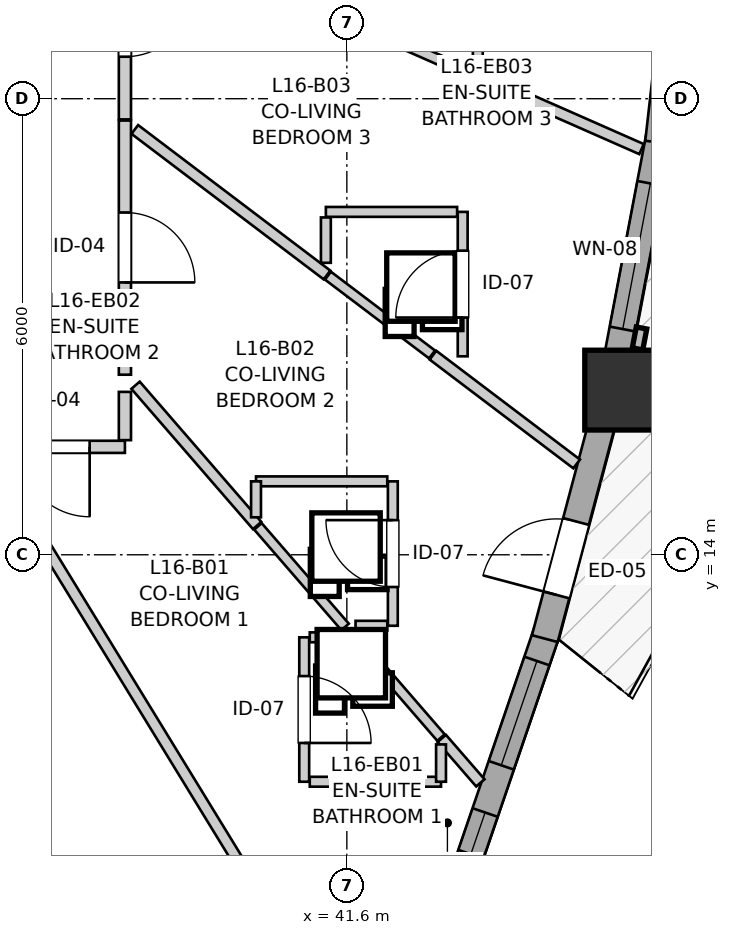
"""IFC4 building model, lengths in metres.
Left out: names, types, materials, properties, quantities, classifications, styles, units other than length and angle.
Written with IfcOpenShell. Run it as: python <this file> out.ifc"""

import sys

from ifc_helpers import new_model, si_unit, direction, frame, frame_2d, origin, origin_2d, place, context, subcontext, project, spatial, rectangle, extrude, source, transform, mapped, element, fill, save


model = new_model("IFC4")
c1 = context("Model", 3, precision=1e-05, world=origin(), true_north=direction((0.0, 1.0)))
c2 = subcontext(c1, "Body", "Model", "MODEL_VIEW")
j1 = project(units=[si_unit("LENGTHUNIT", "METRE"), si_unit("PLANEANGLEUNIT", "RADIAN")], contexts=[c1])
p1 = place(None, origin())
s1 = spatial("IfcSite", under=j1, at=p1, CompositionType="ELEMENT")
p2 = place(p1, origin())
s2 = spatial("IfcBuilding", under=s1, at=p2, CompositionType="ELEMENT")
p3 = place(p2, frame((0.0, 0.0, 55.8)))
s3 = spatial("IfcBuildingStorey", under=s2, at=p3, CompositionType="ELEMENT", Elevation=55.8)
m1 = source(origin(), c2, "Body", "SweptSolid", [
    extrude(rectangle(XDim=1.05, YDim=1.05, at=origin_2d()), origin(), (0.0, 0.0, 1.0), 2.94),
])
p4 = place(p3, frame((45.256, 16.166, 0.0), z_axis=(0.0, 0.0, 1.0), x_axis=(1.0, 0.0, 0.0)))
e1 = element("IfcColumn", 1, at=p4, inside=s3, PredefinedType="COLUMN", context=c2, shape_type="MappedRepresentation", body=[
    mapped(m1, transform((0.0, 0.0, 0.0), x_axis=(1.0, 0.0, 0.0), y_axis=(0.0, 1.0, 0.0), z_axis=(0.0, 0.0, 1.0), scale=1.0)),
])
p5 = place(p3, frame((43.104, 9.686, 0.0), z_axis=(0.0, 0.0, 1.0), x_axis=(0.323558843572, 0.946208050455, 0.0)))
e2 = element("IfcWall", 2, at=p5, inside=s3, PredefinedType="SOLIDWALL", context=c2, shape_type="SweptSolid", body=[
    extrude(rectangle(XDim=3.482, YDim=0.35, at=frame_2d((1.741, 0.0))), origin(), (0.0, 0.0, 1.0), 2.42),
])
p6 = place(p5, frame((0.396, 0.0, 0.82)))
e3 = element("IfcOpeningElement", 3, at=p6, cuts=e2, PredefinedType="OPENING", context=c2, shape_type="SweptSolid", body=[
    extrude(rectangle(XDim=0.58, YDim=1.35, at=frame_2d((0.29, 0.675))), frame((0.0, 0.185, 0.0), z_axis=(0.0, -1.0, 0.0), x_axis=(1.0, 0.0, 0.0)), (0.0, 0.0, 1.0), 0.37),
])
p7 = place(p5, frame((1.632, 0.0, 0.82)))
e4 = element("IfcOpeningElement", 4, at=p7, cuts=e2, PredefinedType="OPENING", context=c2, shape_type="SweptSolid", body=[
    extrude(rectangle(XDim=1.45, YDim=1.25, at=frame_2d((0.725, 0.625))), frame((0.0, 0.185, 0.0), z_axis=(0.0, -1.0, 0.0), x_axis=(1.0, 0.0, 0.0)), (0.0, 0.0, 1.0), 0.37),
])
p8 = place(p3, frame((44.205, 12.897, 0.0), z_axis=(0.0, 0.0, 1.0), x_axis=(0.257099428233, 0.966384956424, 0.0)))
e5 = element("IfcWall", 5, at=p8, inside=s3, PredefinedType="SOLIDWALL", context=c2, shape_type="SweptSolid", body=[
    extrude(rectangle(XDim=3.13, YDim=0.35, at=frame_2d((1.565, 0.0))), origin(), (0.0, 0.0, 1.0), 2.42),
])
p9 = place(p8, frame((0.595, 0.0, 0.0)))
e6 = element("IfcOpeningElement", 6, at=p9, cuts=e5, PredefinedType="OPENING", context=c2, shape_type="SweptSolid", body=[
    extrude(rectangle(XDim=1.0, YDim=2.1, at=frame_2d((0.5, 1.05))), frame((0.0, 0.185, 0.0), z_axis=(0.0, -1.0, 0.0), x_axis=(1.0, 0.0, 0.0)), (0.0, 0.0, 1.0), 0.37),
])
p10 = place(p3, frame((45.14, 16.494, 0.0), z_axis=(0.0, 0.0, 1.0), x_axis=(0.186608529586, 0.982434352354, 0.0)))
e7 = element("IfcWall", 7, at=p10, inside=s3, PredefinedType="SOLIDWALL", context=c2, shape_type="SweptSolid", body=[
    extrude(rectangle(XDim=3.074, YDim=0.35, at=frame_2d((1.537, 0.0))), origin(), (0.0, 0.0, 1.0), 2.42),
])
p11 = place(p10, frame((0.484, 0.0, 0.82)))
e8 = element("IfcOpeningElement", 8, at=p11, cuts=e7, PredefinedType="OPENING", context=c2, shape_type="SweptSolid", body=[
    extrude(rectangle(XDim=1.95, YDim=1.4, at=frame_2d((0.975, 0.7))), frame((0.0, 0.185, 0.0), z_axis=(0.0, -1.0, 0.0), x_axis=(1.0, 0.0, 0.0)), (0.0, 0.0, 1.0), 0.37),
])
p12 = place(p3, frame((45.7, 19.426, 0.0), z_axis=(0.0, 0.0, 1.0), x_axis=(0.113266370988, 0.993564657787, 0.0)))
e9 = element("IfcWall", 9, at=p12, inside=s3, PredefinedType="SOLIDWALL", context=c2, shape_type="SweptSolid", body=[
    extrude(rectangle(XDim=3.317, YDim=0.35, at=frame_2d((1.659, 0.0))), origin(), (0.0, 0.0, 1.0), 2.42),
])
p13 = place(p12, frame((0.869, 0.0, 0.82)))
e10 = element("IfcOpeningElement", 10, at=p13, cuts=e9, PredefinedType="OPENING", context=c2, shape_type="SweptSolid", body=[
    extrude(rectangle(XDim=1.6, YDim=1.35, at=frame_2d((0.8, 0.675))), frame((0.0, 0.185, 0.0), z_axis=(0.0, -1.0, 0.0), x_axis=(1.0, 0.0, 0.0)), (0.0, 0.0, 1.0), 0.37),
])
p14 = place(p3, frame((38.68, 19.713, 0.0), z_axis=(0.0, 0.0, 1.0), x_axis=(0.0, -1.0, 0.0)))
e11 = element("IfcWall", 11, at=p14, inside=s3, PredefinedType="PARTITIONING", context=c2, shape_type="SweptSolid", body=[
    extrude(rectangle(XDim=3.344, YDim=0.16, at=frame_2d((1.672, 0.0))), origin(), (0.0, 0.0, 1.0), 2.94),
])
p15 = place(p14, frame((1.21, 0.0, 0.0)))
e12 = element("IfcOpeningElement", 12, at=p15, cuts=e11, PredefinedType="OPENING", context=c2, shape_type="SweptSolid", body=[
    extrude(rectangle(XDim=0.92, YDim=2.1, at=frame_2d((0.46, 1.05))), frame((0.0, 0.09, 0.0), z_axis=(0.0, -1.0, 0.0), x_axis=(1.0, 0.0, 0.0)), (0.0, 0.0, 1.0), 0.18),
])
p16 = place(p3, frame((38.68, 22.348, 0.0), z_axis=(0.0, 0.0, 1.0), x_axis=(0.0, -1.0, 0.0)))
e13 = element("IfcWall", 13, at=p16, inside=s3, PredefinedType="PARTITIONING", context=c2, shape_type="SweptSolid", body=[
    extrude(rectangle(XDim=2.62, YDim=0.16, at=frame_2d((1.31, 0.0))), origin(), (0.0, 0.0, 1.0), 2.94),
])
p17 = place(p16, frame((0.875, 0.0, 0.0)))
e14 = element("IfcOpeningElement", 14, at=p17, cuts=e13, PredefinedType="OPENING", context=c2, shape_type="SweptSolid", body=[
    extrude(rectangle(XDim=0.92, YDim=2.1, at=frame_2d((0.46, 1.05))), frame((0.0, 0.09, 0.0), z_axis=(0.0, -1.0, 0.0), x_axis=(1.0, 0.0, 0.0)), (0.0, 0.0, 1.0), 0.18),
])
p18 = place(p3, frame((41.039, 12.914, 0.0), z_axis=(0.0, 0.0, 1.0), x_axis=(0.0, -1.0, 0.0)))
e15 = element("IfcWall", 15, at=p18, inside=s3, PredefinedType="PARTITIONING", context=c2, shape_type="SweptSolid", body=[
    extrude(rectangle(XDim=1.9, YDim=0.13, at=frame_2d((0.95, 0.0))), origin(), (0.0, 0.0, 1.0), 2.94),
])
p19 = place(p18, frame((0.51, 0.0, 0.0)))
e16 = element("IfcOpeningElement", 16, at=p19, cuts=e15, PredefinedType="OPENING", context=c2, shape_type="SweptSolid", body=[
    extrude(rectangle(XDim=0.88, YDim=2.05, at=frame_2d((0.44, 1.025))), frame((0.0, 0.075, 0.0), z_axis=(0.0, -1.0, 0.0), x_axis=(1.0, 0.0, 0.0)), (0.0, 0.0, 1.0), 0.15),
])
p20 = place(p3, frame((42.205, 13.066, 0.0), z_axis=(0.0, 0.0, 1.0), x_axis=(0.0, 1.0, 0.0)))
e17 = element("IfcWall", 17, at=p20, inside=s3, PredefinedType="PARTITIONING", context=c2, shape_type="SweptSolid", body=[
    extrude(rectangle(XDim=1.9, YDim=0.13, at=frame_2d((0.95, 0.0))), origin(), (0.0, 0.0, 1.0), 2.94),
])
p21 = place(p20, frame((0.51, 0.0, 0.0)))
e18 = element("IfcOpeningElement", 18, at=p21, cuts=e17, PredefinedType="OPENING", context=c2, shape_type="SweptSolid", body=[
    extrude(rectangle(XDim=0.88, YDim=2.05, at=frame_2d((0.44, 1.025))), frame((0.0, 0.075, 0.0), z_axis=(0.0, -1.0, 0.0), x_axis=(1.0, 0.0, 0.0)), (0.0, 0.0, 1.0), 0.15),
])
p22 = place(p3, frame((43.124, 16.611, 0.0), z_axis=(0.0, 0.0, 1.0), x_axis=(0.0, 1.0, 0.0)))
e19 = element("IfcWall", 19, at=p22, inside=s3, PredefinedType="PARTITIONING", context=c2, shape_type="SweptSolid", body=[
    extrude(rectangle(XDim=1.9, YDim=0.13, at=frame_2d((0.95, 0.0))), origin(), (0.0, 0.0, 1.0), 2.94),
])
p23 = place(p22, frame((0.51, 0.0, 0.0)))
e20 = element("IfcOpeningElement", 20, at=p23, cuts=e19, PredefinedType="OPENING", context=c2, shape_type="SweptSolid", body=[
    extrude(rectangle(XDim=0.88, YDim=2.05, at=frame_2d((0.44, 1.025))), frame((0.0, 0.075, 0.0), z_axis=(0.0, -1.0, 0.0), x_axis=(1.0, 0.0, 0.0)), (0.0, 0.0, 1.0), 0.15),
])
p24 = place(p3, frame((43.323, 20.286, 0.0), z_axis=(0.0, 0.0, 1.0), x_axis=(0.0, 1.0, 0.0)))
e21 = element("IfcWall", 21, at=p24, inside=s3, PredefinedType="PARTITIONING", context=c2, shape_type="SweptSolid", body=[
    extrude(rectangle(XDim=1.845, YDim=0.13, at=frame_2d((0.923, 0.0))), origin(), (0.0, 0.0, 1.0), 2.94),
])
p25 = place(p24, frame((0.482, 0.0, 0.0)))
e22 = element("IfcOpeningElement", 22, at=p25, cuts=e21, PredefinedType="OPENING", context=c2, shape_type="SweptSolid", body=[
    extrude(rectangle(XDim=0.88, YDim=2.05, at=frame_2d((0.44, 1.025))), frame((0.0, 0.075, 0.0), z_axis=(0.0, -1.0, 0.0), x_axis=(1.0, 0.0, 0.0)), (0.0, 0.0, 1.0), 0.15),
])
p26 = place(p3, frame((38.68, 15.42, 0.0), z_axis=(0.0, 0.0, 1.0), x_axis=(-1.0, 0.0, 0.0)))
e23 = element("IfcWall", 23, at=p26, inside=s3, PredefinedType="PARTITIONING", context=c2, shape_type="SweptSolid", body=[
    extrude(rectangle(XDim=1.816, YDim=0.16, at=frame_2d((0.908, 0.0))), origin(), (0.0, 0.0, 1.0), 2.94),
])
p27 = place(p26, frame((0.464, 0.0, 0.0)))
e24 = element("IfcOpeningElement", 24, at=p27, cuts=e23, PredefinedType="OPENING", context=c2, shape_type="SweptSolid", body=[
    extrude(rectangle(XDim=0.92, YDim=2.1, at=frame_2d((0.46, 1.05))), frame((0.0, 0.09, 0.0), z_axis=(0.0, -1.0, 0.0), x_axis=(1.0, 0.0, 0.0)), (0.0, 0.0, 1.0), 0.18),
])
p28 = place(p3, frame((36.908, 15.295, 0.0), z_axis=(0.0, 0.0, 1.0), x_axis=(0.522407183079, -0.852696156358, 0.0)))
e25 = element("IfcWall", 25, at=p28, inside=s3, PredefinedType="PARTITIONING", context=c2, shape_type="SweptSolid", body=[
    extrude(rectangle(XDim=9.87, YDim=0.145, at=frame_2d((4.935, 0.0))), origin(), (0.0, 0.0, 1.0), 2.94),
])
p29 = place(p3, frame((38.81, 19.595, 0.0), z_axis=(0.0, 0.0, 1.0), x_axis=(0.797304275437, -0.603577577756, 0.0)))
e26 = element("IfcWall", 26, at=p29, inside=s3, PredefinedType="PARTITIONING", context=c2, shape_type="SweptSolid", body=[
    extrude(rectangle(XDim=3.172, YDim=0.145, at=frame_2d((1.586, 0.0))), origin(), (0.0, 0.0, 1.0), 2.94),
])
p30 = place(p3, frame((38.82, 16.23, 0.0), z_axis=(0.0, 0.0, 1.0), x_axis=(0.655037088123, -0.755596726556, 0.0)))
e27 = element("IfcWall", 27, at=p30, inside=s3, PredefinedType="PARTITIONING", context=c2, shape_type="SweptSolid", body=[
    extrude(rectangle(XDim=2.442, YDim=0.145, at=frame_2d((1.221, 0.0))), origin(), (0.0, 0.0, 1.0), 2.94),
])
p31 = place(p3, frame((43.41, 20.248, 0.0), z_axis=(0.0, 0.0, 1.0), x_axis=(0.915032786041, -0.403379474527, 0.0)))
e28 = element("IfcWall", 28, at=p31, inside=s3, PredefinedType="PARTITIONING", context=c2, shape_type="SweptSolid", body=[
    extrude(rectangle(XDim=2.259, YDim=0.145, at=frame_2d((1.13, 0.0))), origin(), (0.0, 0.0, 1.0), 2.94),
])
p32 = place(p3, frame((42.733, 16.626, 0.0), z_axis=(0.0, 0.0, 1.0), x_axis=(0.797372907097, -0.603486907089, 0.0)))
e29 = element("IfcWall", 29, at=p32, inside=s3, PredefinedType="PARTITIONING", context=c2, shape_type="SweptSolid", body=[
    extrude(rectangle(XDim=2.371, YDim=0.145, at=frame_2d((1.186, 0.0))), origin(), (0.0, 0.0, 1.0), 2.94),
])
p33 = place(p3, frame((41.65, 21.023, 0.0), z_axis=(0.0, 0.0, 1.0), x_axis=(0.915165742406, -0.403077739309, 0.0)))
e30 = element("IfcWall", 30, at=p33, inside=s3, PredefinedType="PARTITIONING", context=c2, shape_type="SweptSolid", body=[
    extrude(rectangle(XDim=1.689, YDim=0.13, at=frame_2d((0.844, 0.0))), origin(), (0.0, 0.0, 1.0), 2.94),
])
for number, where, z_axis, x_axis in (
    (31, (41.324, 18.511, 0.0), (0.0, 0.0, 1.0), (1.0, 0.0, 0.0)),
    (32, (41.112, 11.014, 0.0), (0.0, 0.0, 1.0), (1.0, 0.0, 0.0)),
    (33, (40.405, 14.966, 0.0), (0.0, 0.0, 1.0), (1.0, 0.0, 0.0)),
):
    element("IfcWall", number, at=place(p3, frame(where, z_axis=z_axis, x_axis=x_axis)), inside=s3, PredefinedType="PARTITIONING", context=c2, shape_type="SweptSolid", body=[
        extrude(rectangle(XDim=1.727, YDim=0.13, at=frame_2d((0.864, 0.0))), origin(), (0.0, 0.0, 1.0), 2.94),
    ])
p34 = place(p3, frame((40.43, 14.374, 0.0), z_axis=(0.0, 0.0, 1.0), x_axis=(0.655121637619, -0.755523421162, 0.0)))
e34 = element("IfcWall", 34, at=p34, inside=s3, PredefinedType="PARTITIONING", context=c2, shape_type="SweptSolid", body=[
    extrude(rectangle(XDim=1.751, YDim=0.13, at=frame_2d((0.875, 0.0))), origin(), (0.0, 0.0, 1.0), 2.94),
])
p35 = place(p3, frame((41.696, 12.914, 0.0), z_axis=(0.0, 0.0, 1.0), x_axis=(0.654882611276, -0.755730616985, 0.0)))
e35 = element("IfcWall", 35, at=p35, inside=s3, PredefinedType="PARTITIONING", context=c2, shape_type="SweptSolid", body=[
    extrude(rectangle(XDim=1.745, YDim=0.13, at=frame_2d((0.873, 0.0))), origin(), (0.0, 0.0, 1.0), 2.94),
])
p36 = place(p3, frame((41.351, 17.672, 0.0), z_axis=(0.0, 0.0, 1.0), x_axis=(0.797400841938, -0.603449995672, 0.0)))
e36 = element("IfcWall", 36, at=p36, inside=s3, PredefinedType="PARTITIONING", context=c2, shape_type="SweptSolid", body=[
    extrude(rectangle(XDim=1.718, YDim=0.13, at=frame_2d((0.859, 0.0))), origin(), (0.0, 0.0, 1.0), 2.94),
])
p37 = place(p3, frame((38.68, 15.508, 0.0), z_axis=(0.0, 0.0, 1.0), x_axis=(0.0, 1.0, 0.0)))
e37 = element("IfcWall", 37, at=p37, inside=s3, PredefinedType="PARTITIONING", context=c2, shape_type="SweptSolid", body=[
    extrude(rectangle(XDim=0.635, YDim=0.16, at=frame_2d((0.317, 0.0))), origin(), (0.0, 0.0, 1.0), 2.94),
])
p38 = place(p3, frame((41.324, 17.841, 0.0), z_axis=(0.0, 0.0, 1.0), x_axis=(0.0, 1.0, 0.0)))
e38 = element("IfcWall", 38, at=p38, inside=s3, PredefinedType="PARTITIONING", context=c2, shape_type="SweptSolid", body=[
    extrude(rectangle(XDim=0.597, YDim=0.13, at=frame_2d((0.298, 0.0))), origin(), (0.0, 0.0, 1.0), 2.94),
])
p39 = place(p3, frame((42.849, 11.584, 0.0), z_axis=(0.0, 0.0, 1.0), x_axis=(0.655530542193, -0.755168662123, 0.0)))
e39 = element("IfcWall", 39, at=p39, inside=s3, PredefinedType="PARTITIONING", context=c2, shape_type="SweptSolid", body=[
    extrude(rectangle(XDim=0.774, YDim=0.145, at=frame_2d((0.387, 0.0))), origin(), (0.0, 0.0, 1.0), 2.94),
])
p40 = place(p3, frame((41.112, 12.914, 0.0), z_axis=(0.0, 0.0, 1.0), x_axis=(1.0, 0.0, 0.0)))
e40 = element("IfcWall", 40, at=p40, inside=s3, PredefinedType="PARTITIONING", context=c2, shape_type="SweptSolid", body=[
    extrude(rectangle(XDim=0.434, YDim=0.13, at=frame_2d((0.217, 0.0))), origin(), (0.0, 0.0, 1.0), 2.94),
])
p41 = place(p3, frame((41.714, 13.066, 0.0), z_axis=(0.0, 0.0, 1.0), x_axis=(1.0, 0.0, 0.0)))
e41 = element("IfcWall", 41, at=p41, inside=s3, PredefinedType="PARTITIONING", context=c2, shape_type="SweptSolid", body=[
    extrude(rectangle(XDim=0.418, YDim=0.13, at=frame_2d((0.209, 0.0))), origin(), (0.0, 0.0, 1.0), 2.94),
])
p42 = place(p3, frame((42.839, 11.014, 0.0), z_axis=(0.0, 0.0, 1.0), x_axis=(0.0, 1.0, 0.0)))
e42 = element("IfcWall", 42, at=p42, inside=s3, PredefinedType="PARTITIONING", context=c2, shape_type="SweptSolid", body=[
    extrude(rectangle(XDim=0.491, YDim=0.13, at=frame_2d((0.246, 0.0))), origin(), (0.0, 0.0, 1.0), 2.94),
])
p43 = place(p3, frame((40.405, 14.493, 0.0), z_axis=(0.0, 0.0, 1.0), x_axis=(0.0, 1.0, 0.0)))
e43 = element("IfcWall", 43, at=p43, inside=s3, PredefinedType="PARTITIONING", context=c2, shape_type="SweptSolid", body=[
    extrude(rectangle(XDim=0.473, YDim=0.13, at=frame_2d((0.237, 0.0))), origin(), (0.0, 0.0, 1.0), 2.94),
])
m2 = source(origin(), c2, "Body", "SweptSolid", [
    extrude(rectangle(XDim=0.58, YDim=1.35, at=frame_2d((0.29, 0.675))), frame((0.0, 0.03, 0.0), z_axis=(0.0, -1.0, 0.0), x_axis=(1.0, 0.0, 0.0)), (0.0, 0.0, 1.0), 0.06),
])
p44 = place(p6, origin())
e44 = element("IfcWindow", 44, at=p44, inside=s3, PartitioningType="SINGLE_PANEL", PredefinedType="WINDOW", context=c2, shape_type="MappedRepresentation", body=[
    mapped(m2, transform((0.0, 0.0, 0.0), x_axis=(1.0, 0.0, 0.0), y_axis=(0.0, 1.0, 0.0), z_axis=(0.0, 0.0, 1.0), scale=1.0)),
])
fill(e3, e44)
m3 = source(origin(), c2, "Body", "SweptSolid", [
    extrude(rectangle(XDim=1.45, YDim=1.25, at=frame_2d((0.725, 0.625))), frame((0.0, 0.03, 0.0), z_axis=(0.0, -1.0, 0.0), x_axis=(1.0, 0.0, 0.0)), (0.0, 0.0, 1.0), 0.06),
])
p45 = place(p7, origin())
e45 = element("IfcWindow", 45, at=p45, inside=s3, PartitioningType="SINGLE_PANEL", PredefinedType="WINDOW", context=c2, shape_type="MappedRepresentation", body=[
    mapped(m3, transform((0.0, 0.0, 0.0), x_axis=(1.0, 0.0, 0.0), y_axis=(0.0, 1.0, 0.0), z_axis=(0.0, 0.0, 1.0), scale=1.0)),
])
fill(e4, e45)
m4 = source(origin(), c2, "Body", "SweptSolid", [
    extrude(rectangle(XDim=1.95, YDim=1.4, at=frame_2d((0.975, 0.7))), frame((0.0, 0.03, 0.0), z_axis=(0.0, -1.0, 0.0), x_axis=(1.0, 0.0, 0.0)), (0.0, 0.0, 1.0), 0.06),
])
p46 = place(p11, origin())
e46 = element("IfcWindow", 46, at=p46, inside=s3, PartitioningType="SINGLE_PANEL", PredefinedType="WINDOW", context=c2, shape_type="MappedRepresentation", body=[
    mapped(m4, transform((0.0, 0.0, 0.0), x_axis=(1.0, 0.0, 0.0), y_axis=(0.0, 1.0, 0.0), z_axis=(0.0, 0.0, 1.0), scale=1.0)),
])
fill(e8, e46)
m5 = source(origin(), c2, "Body", "SweptSolid", [
    extrude(rectangle(XDim=1.0, YDim=2.1, at=frame_2d((0.5, 1.05))), frame((0.0, 0.025, 0.0), z_axis=(0.0, -1.0, 0.0), x_axis=(1.0, 0.0, 0.0)), (0.0, 0.0, 1.0), 0.05),
])
p47 = place(p9, origin())
e47 = element("IfcDoor", 47, at=p47, inside=s3, OperationType="SINGLE_SWING_LEFT", PredefinedType="DOOR", context=c2, shape_type="MappedRepresentation", body=[
    mapped(m5, transform((0.0, 0.0, 0.0), x_axis=(1.0, 0.0, 0.0), y_axis=(0.0, 1.0, 0.0), z_axis=(0.0, 0.0, 1.0), scale=1.0)),
])
fill(e6, e47)
m6 = source(origin(), c2, "Body", "SweptSolid", [
    extrude(rectangle(XDim=0.92, YDim=2.1, at=frame_2d((0.46, 1.05))), frame((0.0, 0.025, 0.0), z_axis=(0.0, -1.0, 0.0), x_axis=(1.0, 0.0, 0.0)), (0.0, 0.0, 1.0), 0.05),
])
p48 = place(p15, origin())
e48 = element("IfcDoor", 48, at=p48, inside=s3, OperationType="SINGLE_SWING_RIGHT", PredefinedType="DOOR", context=c2, shape_type="MappedRepresentation", body=[
    mapped(m6, transform((0.0, 0.0, 0.0), x_axis=(1.0, 0.0, 0.0), y_axis=(0.0, 1.0, 0.0), z_axis=(0.0, 0.0, 1.0), scale=1.0)),
])
fill(e12, e48)
p49 = place(p17, origin())
e49 = element("IfcDoor", 49, at=p49, inside=s3, OperationType="SINGLE_SWING_LEFT", PredefinedType="DOOR", context=c2, shape_type="MappedRepresentation", body=[
    mapped(m6, transform((0.0, 0.0, 0.0), x_axis=(1.0, 0.0, 0.0), y_axis=(0.0, 1.0, 0.0), z_axis=(0.0, 0.0, 1.0), scale=1.0)),
])
fill(e14, e49)
m7 = source(origin(), c2, "Body", "SweptSolid", [
    extrude(rectangle(XDim=0.88, YDim=2.05, at=frame_2d((0.44, 1.025))), frame((0.0, 0.025, 0.0), z_axis=(0.0, -1.0, 0.0), x_axis=(1.0, 0.0, 0.0)), (0.0, 0.0, 1.0), 0.05),
])
p50 = place(p19, origin())
e50 = element("IfcDoor", 50, at=p50, inside=s3, OperationType="SINGLE_SWING_RIGHT", PredefinedType="DOOR", context=c2, shape_type="MappedRepresentation", body=[
    mapped(m7, transform((0.0, 0.0, 0.0), x_axis=(1.0, 0.0, 0.0), y_axis=(0.0, 1.0, 0.0), z_axis=(0.0, 0.0, 1.0), scale=1.0)),
])
fill(e16, e50)
p51 = place(p21, origin())
e51 = element("IfcDoor", 51, at=p51, inside=s3, OperationType="SINGLE_SWING_RIGHT", PredefinedType="DOOR", context=c2, shape_type="MappedRepresentation", body=[
    mapped(m7, transform((0.0, 0.0, 0.0), x_axis=(1.0, 0.0, 0.0), y_axis=(0.0, 1.0, 0.0), z_axis=(0.0, 0.0, 1.0), scale=1.0)),
])
fill(e18, e51)
p52 = place(p23, origin())
e52 = element("IfcDoor", 52, at=p52, inside=s3, OperationType="SINGLE_SWING_LEFT", PredefinedType="DOOR", context=c2, shape_type="MappedRepresentation", body=[
    mapped(m7, transform((0.0, 0.0, 0.0), x_axis=(1.0, 0.0, 0.0), y_axis=(0.0, 1.0, 0.0), z_axis=(0.0, 0.0, 1.0), scale=1.0)),
])
fill(e20, e52)
p53 = place(p27, origin())
e53 = element("IfcDoor", 53, at=p53, inside=s3, OperationType="SINGLE_SWING_LEFT", PredefinedType="DOOR", context=c2, shape_type="MappedRepresentation", body=[
    mapped(m6, transform((0.0, 0.0, 0.0), x_axis=(1.0, 0.0, 0.0), y_axis=(0.0, 1.0, 0.0), z_axis=(0.0, 0.0, 1.0), scale=1.0)),
])
fill(e24, e53)
save(model, sys.argv[1])
